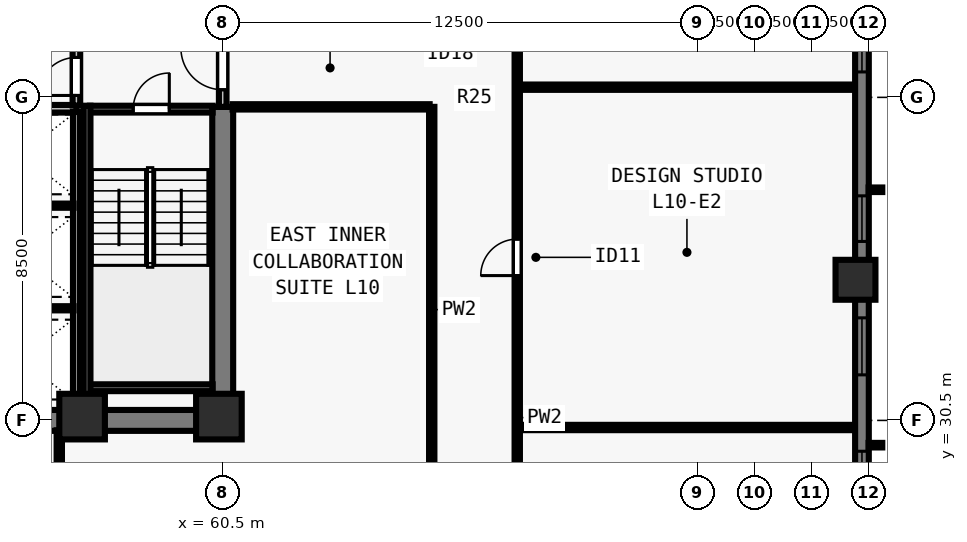
"""IFC4 building model, lengths in metres.
Left out: names, types, materials, properties, quantities, classifications, styles, units other than length and angle.
Written with IfcOpenShell. Run it as: python <this file> out.ifc"""

import sys

from ifc_helpers import new_model, si_unit, direction, frame, frame_2d, origin, origin_2d, place, context, subcontext, project, spatial, rectangle, extrude, element, fill, save


model = new_model("IFC4")
c1 = context("Model", 3, precision=1e-05, world=origin(), true_north=direction((0.0, 1.0)))
c2 = subcontext(c1, "Body", "Model", "MODEL_VIEW")
j1 = project(units=[si_unit("LENGTHUNIT", "METRE"), si_unit("PLANEANGLEUNIT", "RADIAN")], contexts=[c1])
p1 = place(None, origin())
s1 = spatial("IfcSite", under=j1, at=p1, CompositionType="ELEMENT")
p2 = place(p1, origin())
s2 = spatial("IfcBuilding", under=s1, at=p2, CompositionType="ELEMENT")
p3 = place(p2, frame((0.0, 0.0, 41.0)))
s3 = spatial("IfcBuildingStorey", under=s2, at=p3, CompositionType="ELEMENT", Elevation=41.0)
for number, where, z_axis, x_axis in (
    (1, (56.8, 30.6, 0.0), (0.0, 0.0, 1.0), (1.0, 0.0, 0.0)),
    (2, (60.4, 30.6, 0.0), (0.0, 0.0, 1.0), (1.0, 0.0, 0.0)),
):
    element("IfcColumn", number, at=place(p3, frame(where, z_axis=z_axis, x_axis=x_axis)), inside=s3, PredefinedType="COLUMN", context=c2, shape_type="SweptSolid", body=[
        extrude(rectangle(XDim=1.2, YDim=1.2, at=origin_2d()), origin(), (0.0, 0.0, 1.0), 3.5),
    ])
p4 = place(p3, frame((77.15, 34.2, 0.0), z_axis=(0.0, 0.0, 1.0), x_axis=(0.0, 1.0, 0.0)))
e3 = element("IfcColumn", 3, at=p4, inside=s3, PredefinedType="COLUMN", context=c2, shape_type="SweptSolid", body=[
    extrude(rectangle(XDim=1.05, YDim=1.05, at=origin_2d()), origin(), (0.0, 0.0, 1.0), 3.5),
])
p5 = place(p3, frame((77.32, 61.5, 0.0), z_axis=(0.0, 0.0, 1.0), x_axis=(0.0, -1.0, 0.0)))
e4 = element("IfcWall", 4, at=p5, inside=s3, PredefinedType="SOLIDWALL", context=c2, shape_type="SweptSolid", body=[
    extrude(rectangle(XDim=44.662, YDim=0.36, at=frame_2d((22.331, 0.0))), origin(), (0.0, 0.0, 1.0), 3.28),
])
p6 = place(p5, frame((4.93, 0.0, 0.8)))
e5 = element("IfcOpeningElement", 5, at=p6, cuts=e4, PredefinedType="OPENING", context=c2, shape_type="SweptSolid", body=[
    extrude(rectangle(XDim=1.2, YDim=1.544, at=frame_2d((0.6, 0.772))), frame((0.0, 0.19, 0.0), z_axis=(0.0, -1.0, 0.0), x_axis=(1.0, 0.0, 0.0)), (0.0, 0.0, 1.0), 0.38),
])
p7 = place(p5, frame((8.14, 0.0, 0.8)))
e6 = element("IfcOpeningElement", 6, at=p7, cuts=e4, PredefinedType="OPENING", context=c2, shape_type="SweptSolid", body=[
    extrude(rectangle(XDim=1.5, YDim=1.544, at=frame_2d((0.75, 0.772))), frame((0.0, 0.19, 0.0), z_axis=(0.0, -1.0, 0.0), x_axis=(1.0, 0.0, 0.0)), (0.0, 0.0, 1.0), 0.38),
])
p8 = place(p5, frame((11.65, 0.0, 0.8)))
e7 = element("IfcOpeningElement", 7, at=p8, cuts=e4, PredefinedType="OPENING", context=c2, shape_type="SweptSolid", body=[
    extrude(rectangle(XDim=1.2, YDim=1.544, at=frame_2d((0.6, 0.772))), frame((0.0, 0.19, 0.0), z_axis=(0.0, -1.0, 0.0), x_axis=(1.0, 0.0, 0.0)), (0.0, 0.0, 1.0), 0.38),
])
p9 = place(p5, frame((15.311, 0.0, 0.8)))
e8 = element("IfcOpeningElement", 8, at=p9, cuts=e4, PredefinedType="OPENING", context=c2, shape_type="SweptSolid", body=[
    extrude(rectangle(XDim=1.5, YDim=1.544, at=frame_2d((0.75, 0.772))), frame((0.0, 0.19, 0.0), z_axis=(0.0, -1.0, 0.0), x_axis=(1.0, 0.0, 0.0)), (0.0, 0.0, 1.0), 0.38),
])
p10 = place(p5, frame((18.821, 0.0, 0.8)))
e9 = element("IfcOpeningElement", 9, at=p10, cuts=e4, PredefinedType="OPENING", context=c2, shape_type="SweptSolid", body=[
    extrude(rectangle(XDim=1.2, YDim=1.544, at=frame_2d((0.6, 0.772))), frame((0.0, 0.19, 0.0), z_axis=(0.0, -1.0, 0.0), x_axis=(1.0, 0.0, 0.0)), (0.0, 0.0, 1.0), 0.38),
])
p11 = place(p5, frame((20.331, 0.0, 0.8)))
e10 = element("IfcOpeningElement", 10, at=p11, cuts=e4, PredefinedType="OPENING", context=c2, shape_type="SweptSolid", body=[
    extrude(rectangle(XDim=1.5, YDim=1.544, at=frame_2d((0.75, 0.772))), frame((0.0, 0.19, 0.0), z_axis=(0.0, -1.0, 0.0), x_axis=(1.0, 0.0, 0.0)), (0.0, 0.0, 1.0), 0.38),
])
p12 = place(p5, frame((25.091, 0.0, 0.8)))
e11 = element("IfcOpeningElement", 11, at=p12, cuts=e4, PredefinedType="OPENING", context=c2, shape_type="SweptSolid", body=[
    extrude(rectangle(XDim=1.2, YDim=1.544, at=frame_2d((0.6, 0.772))), frame((0.0, 0.19, 0.0), z_axis=(0.0, -1.0, 0.0), x_axis=(1.0, 0.0, 0.0)), (0.0, 0.0, 1.0), 0.38),
])
p13 = place(p5, frame((28.302, 0.0, 0.8)))
e12 = element("IfcOpeningElement", 12, at=p13, cuts=e4, PredefinedType="OPENING", context=c2, shape_type="SweptSolid", body=[
    extrude(rectangle(XDim=1.5, YDim=1.544, at=frame_2d((0.75, 0.772))), frame((0.0, 0.19, 0.0), z_axis=(0.0, -1.0, 0.0), x_axis=(1.0, 0.0, 0.0)), (0.0, 0.0, 1.0), 0.38),
])
p14 = place(p5, frame((31.812, 0.0, 0.8)))
e13 = element("IfcOpeningElement", 13, at=p14, cuts=e4, PredefinedType="OPENING", context=c2, shape_type="SweptSolid", body=[
    extrude(rectangle(XDim=1.2, YDim=1.544, at=frame_2d((0.6, 0.772))), frame((0.0, 0.19, 0.0), z_axis=(0.0, -1.0, 0.0), x_axis=(1.0, 0.0, 0.0)), (0.0, 0.0, 1.0), 0.38),
])
p15 = place(p5, frame((35.022, 0.0, 0.8)))
e14 = element("IfcOpeningElement", 14, at=p15, cuts=e4, PredefinedType="OPENING", context=c2, shape_type="SweptSolid", body=[
    extrude(rectangle(XDim=1.5, YDim=1.544, at=frame_2d((0.75, 0.772))), frame((0.0, 0.19, 0.0), z_axis=(0.0, -1.0, 0.0), x_axis=(1.0, 0.0, 0.0)), (0.0, 0.0, 1.0), 0.38),
])
p16 = place(p5, frame((38.532, 0.0, 0.8)))
e15 = element("IfcOpeningElement", 15, at=p16, cuts=e4, PredefinedType="OPENING", context=c2, shape_type="SweptSolid", body=[
    extrude(rectangle(XDim=1.2, YDim=1.544, at=frame_2d((0.6, 0.772))), frame((0.0, 0.19, 0.0), z_axis=(0.0, -1.0, 0.0), x_axis=(1.0, 0.0, 0.0)), (0.0, 0.0, 1.0), 0.38),
])
p17 = place(p3, frame((43.225, 30.5, 0.0), z_axis=(0.0, 0.0, 1.0), x_axis=(1.0, 0.0, 0.0)))
e16 = element("IfcWall", 16, at=p17, inside=s3, PredefinedType="SHEAR", context=c2, shape_type="SweptSolid", body=[
    extrude(rectangle(XDim=17.55, YDim=0.55, at=frame_2d((8.775, 0.0))), origin(), (0.0, 0.0, 1.0), 3.28),
])
p18 = place(p3, frame((60.5, 30.765, 0.0), z_axis=(0.0, 0.0, 1.0), x_axis=(0.0, 1.0, 0.0)))
e17 = element("IfcWall", 17, at=p18, inside=s3, PredefinedType="SHEAR", context=c2, shape_type="SweptSolid", body=[
    extrude(rectangle(XDim=7.985, YDim=0.55, at=frame_2d((3.993, 0.0))), origin(), (0.0, 0.0, 1.0), 3.28),
])
p19 = place(p3, frame((53.7, 38.7, 0.0), z_axis=(0.0, 0.0, 1.0), x_axis=(1.0, 0.0, 0.0)))
e18 = element("IfcWall", 18, at=p19, inside=s3, PredefinedType="SOLIDWALL", context=c2, shape_type="SweptSolid", body=[
    extrude(rectangle(XDim=2.95, YDim=0.2, at=frame_2d((1.475, 0.0))), origin(), (0.0, 0.0, 1.0), 3.28),
])
p20 = place(p3, frame((60.5, 38.75, 0.0), z_axis=(0.0, 0.0, 1.0), x_axis=(0.0, 1.0, 0.0)))
e19 = element("IfcWall", 19, at=p20, inside=s3, PredefinedType="SOLIDWALL", context=c2, shape_type="SweptSolid", body=[
    extrude(rectangle(XDim=2.05, YDim=0.2, at=frame_2d((1.025, 0.0))), origin(), (0.0, 0.0, 1.0), 3.28),
])
p21 = place(p20, frame((0.45, 0.0, 0.0)))
e20 = element("IfcOpeningElement", 20, at=p21, cuts=e19, PredefinedType="OPENING", context=c2, shape_type="SweptSolid", body=[
    extrude(rectangle(XDim=1.1, YDim=2.15, at=frame_2d((0.55, 1.075))), frame((0.0, 0.11, 0.0), z_axis=(0.0, -1.0, 0.0), x_axis=(1.0, 0.0, 0.0)), (0.0, 0.0, 1.0), 0.22),
])
p22 = place(p3, frame((56.65, 38.785, 0.0), z_axis=(0.0, 0.0, 1.0), x_axis=(0.0, 1.0, 0.0)))
e21 = element("IfcWall", 21, at=p22, inside=s3, PredefinedType="SOLIDWALL", context=c2, shape_type="SweptSolid", body=[
    extrude(rectangle(XDim=4.865, YDim=0.2, at=frame_2d((2.433, 0.0))), origin(), (0.0, 0.0, 1.0), 3.28),
])
p23 = place(p22, frame((0.265, 0.0, 0.0)))
e22 = element("IfcOpeningElement", 22, at=p23, cuts=e21, PredefinedType="OPENING", context=c2, shape_type="SweptSolid", body=[
    extrude(rectangle(XDim=1.0, YDim=2.15, at=frame_2d((0.5, 1.075))), frame((0.0, 0.11, 0.0), z_axis=(0.0, -1.0, 0.0), x_axis=(1.0, 0.0, 0.0)), (0.0, 0.0, 1.0), 0.22),
])
p24 = place(p3, frame((56.65, 30.76, 0.0), z_axis=(0.0, 0.0, 1.0), x_axis=(0.0, 1.0, 0.0)))
e23 = element("IfcWall", 23, at=p24, inside=s3, PredefinedType="SOLIDWALL", context=c2, shape_type="SweptSolid", body=[
    extrude(rectangle(XDim=7.855, YDim=0.18, at=frame_2d((3.927, 0.0))), origin(), (0.0, 0.0, 1.0), 3.28),
])
for number, where, z_axis, x_axis in (
    (24, (53.785, 33.45, 0.0), (0.0, 0.0, 1.0), (1.0, 0.0, 0.0)),
    (25, (53.785, 36.15, 0.0), (0.0, 0.0, 1.0), (1.0, 0.0, 0.0)),
):
    element("IfcWall", number, at=place(p3, frame(where, z_axis=z_axis, x_axis=x_axis)), inside=s3, PredefinedType="PARTITIONING", context=c2, shape_type="SweptSolid", body=[
        extrude(rectangle(XDim=2.79, YDim=0.11, at=frame_2d((1.395, 0.0))), origin(), (0.0, 0.0, 1.0), 3.28),
    ])
p25 = place(p3, frame((68.25, 22.355, 0.0), z_axis=(0.0, 0.0, 1.0), x_axis=(0.0, 1.0, 0.0)))
e26 = element("IfcWall", 26, at=p25, inside=s3, PredefinedType="PARTITIONING", context=c2, shape_type="SweptSolid", body=[
    extrude(rectangle(XDim=33.29, YDim=0.14, at=frame_2d((16.645, 0.0))), origin(), (0.0, 0.0, 1.0), 3.28),
])
p26 = place(p25, frame((3.522, 0.0, 0.0)))
e27 = element("IfcOpeningElement", 27, at=p26, cuts=e26, PredefinedType="OPENING", context=c2, shape_type="SweptSolid", body=[
    extrude(rectangle(XDim=0.96, YDim=2.12, at=frame_2d((0.48, 1.06))), frame((0.0, 0.08, 0.0), z_axis=(0.0, -1.0, 0.0), x_axis=(1.0, 0.0, 0.0)), (0.0, 0.0, 1.0), 0.16),
])
p27 = place(p25, frame((11.956, 0.0, 0.0)))
e28 = element("IfcOpeningElement", 28, at=p27, cuts=e26, PredefinedType="OPENING", context=c2, shape_type="SweptSolid", body=[
    extrude(rectangle(XDim=0.96, YDim=2.12, at=frame_2d((0.48, 1.06))), frame((0.0, 0.08, 0.0), z_axis=(0.0, -1.0, 0.0), x_axis=(1.0, 0.0, 0.0)), (0.0, 0.0, 1.0), 0.16),
])
p28 = place(p25, frame((20.256, 0.0, 0.0)))
e29 = element("IfcOpeningElement", 29, at=p28, cuts=e26, PredefinedType="OPENING", context=c2, shape_type="SweptSolid", body=[
    extrude(rectangle(XDim=0.96, YDim=2.12, at=frame_2d((0.48, 1.06))), frame((0.0, 0.08, 0.0), z_axis=(0.0, -1.0, 0.0), x_axis=(1.0, 0.0, 0.0)), (0.0, 0.0, 1.0), 0.16),
])
p29 = place(p25, frame((28.422, 0.0, 0.0)))
e30 = element("IfcOpeningElement", 30, at=p29, cuts=e26, PredefinedType="OPENING", context=c2, shape_type="SweptSolid", body=[
    extrude(rectangle(XDim=0.96, YDim=2.12, at=frame_2d((0.48, 1.06))), frame((0.0, 0.08, 0.0), z_axis=(0.0, -1.0, 0.0), x_axis=(1.0, 0.0, 0.0)), (0.0, 0.0, 1.0), 0.16),
])
p30 = place(p3, frame((66.0, 24.605, 0.0), z_axis=(0.0, 0.0, 1.0), x_axis=(0.0, 1.0, 0.0)))
e31 = element("IfcWall", 31, at=p30, inside=s3, PredefinedType="PARTITIONING", context=c2, shape_type="SweptSolid", body=[
    extrude(rectangle(XDim=14.145, YDim=0.14, at=frame_2d((7.073, 0.0))), origin(), (0.0, 0.0, 1.0), 3.28),
])
p31 = place(p30, frame((2.445, 0.0, 0.0)))
e32 = element("IfcOpeningElement", 32, at=p31, cuts=e31, PredefinedType="OPENING", context=c2, shape_type="SweptSolid", body=[
    extrude(rectangle(XDim=0.88, YDim=2.1, at=frame_2d((0.44, 1.05))), frame((0.0, 0.08, 0.0), z_axis=(0.0, -1.0, 0.0), x_axis=(1.0, 0.0, 0.0)), (0.0, 0.0, 1.0), 0.16),
])
p32 = place(p3, frame((60.76, 38.75, 0.0), z_axis=(0.0, 0.0, 1.0), x_axis=(1.0, 0.0, 0.0)))
e33 = element("IfcWall", 33, at=p32, inside=s3, PredefinedType="PARTITIONING", context=c2, shape_type="SweptSolid", body=[
    extrude(rectangle(XDim=5.185, YDim=0.14, at=frame_2d((2.593, 0.0))), origin(), (0.0, 0.0, 1.0), 3.28),
])
p33 = place(p3, frame((56.2, 24.605, 0.0), z_axis=(0.0, 0.0, 1.0), x_axis=(0.0, 1.0, 0.0)))
e34 = element("IfcWall", 34, at=p33, inside=s3, PredefinedType="PARTITIONING", context=c2, shape_type="SweptSolid", body=[
    extrude(rectangle(XDim=5.635, YDim=0.14, at=frame_2d((2.817, 0.0))), origin(), (0.0, 0.0, 1.0), 2.849),
])
for number, where, z_axis, x_axis in (
    (35, (68.35, 30.313, 0.0), (0.0, 0.0, 1.0), (1.0, 0.0, 0.0)),
    (36, (68.35, 39.268, 0.0), (0.0, 0.0, 1.0), (1.0, 0.0, 0.0)),
):
    element("IfcWall", number, at=place(p3, frame(where, z_axis=z_axis, x_axis=x_axis)), inside=s3, PredefinedType="PARTITIONING", context=c2, shape_type="SweptSolid", body=[
        extrude(rectangle(XDim=8.73, YDim=0.14, at=frame_2d((4.365, 0.0))), origin(), (0.0, 0.0, 1.0), 3.28),
    ])
p34 = place(p3, frame((57.005, 38.69, 0.0), z_axis=(0.0, 0.0, 1.0), x_axis=(1.0, 0.0, 0.0)))
e37 = element("IfcWall", 37, at=p34, inside=s3, PredefinedType="SOLIDWALL", context=c2, shape_type="SweptSolid", body=[
    extrude(rectangle(XDim=3.23, YDim=0.18, at=frame_2d((1.615, 0.0))), origin(), (0.0, 0.0, 1.0), 3.28),
])
p35 = place(p34, frame((1.14, 0.0, 0.0)))
e38 = element("IfcOpeningElement", 38, at=p35, cuts=e37, PredefinedType="OPENING", context=c2, shape_type="SweptSolid", body=[
    extrude(rectangle(XDim=0.95, YDim=2.15, at=frame_2d((0.475, 1.075))), frame((0.0, 0.1, 0.0), z_axis=(0.0, -1.0, 0.0), x_axis=(1.0, 0.0, 0.0)), (0.0, 0.0, 1.0), 0.2),
])
p36 = place(p3, frame((57.005, 31.36, 0.0), z_axis=(0.0, 0.0, 1.0), x_axis=(1.0, 0.0, 0.0)))
e39 = element("IfcWall", 39, at=p36, inside=s3, PredefinedType="SOLIDWALL", context=c2, shape_type="SweptSolid", body=[
    extrude(rectangle(XDim=3.23, YDim=0.18, at=frame_2d((1.615, 0.0))), origin(), (0.0, 0.0, 1.0), 3.28),
])
p37 = place(p3, frame((56.93, 38.78, 0.0), z_axis=(0.0, 0.0, 1.0), x_axis=(0.0, -1.0, 0.0)))
e40 = element("IfcWall", 40, at=p37, inside=s3, PredefinedType="SOLIDWALL", context=c2, shape_type="SweptSolid", body=[
    extrude(rectangle(XDim=8.017, YDim=0.18, at=frame_2d((4.009, 0.0))), origin(), (0.0, 0.0, 1.0), 3.28),
])
p38 = place(p11, origin())
e41 = element("IfcWindow", 41, at=p38, inside=s3, PartitioningType="SINGLE_PANEL", PredefinedType="WINDOW", context=c2, shape_type="SweptSolid", body=[
    extrude(rectangle(XDim=1.5, YDim=1.544, at=frame_2d((0.75, 0.772))), frame((0.0, -0.05, 0.0), z_axis=(0.0, -1.0, 0.0), x_axis=(1.0, 0.0, 0.0)), (0.0, 0.0, 1.0), 0.06),
])
fill(e10, e41)
p39 = place(p12, origin())
e42 = element("IfcWindow", 42, at=p39, inside=s3, PartitioningType="SINGLE_PANEL", PredefinedType="WINDOW", context=c2, shape_type="SweptSolid", body=[
    extrude(rectangle(XDim=1.2, YDim=1.544, at=frame_2d((0.6, 0.772))), frame((0.0, -0.05, 0.0), z_axis=(0.0, -1.0, 0.0), x_axis=(1.0, 0.0, 0.0)), (0.0, 0.0, 1.0), 0.06),
])
fill(e11, e42)
p40 = place(p13, origin())
e43 = element("IfcWindow", 43, at=p40, inside=s3, PartitioningType="SINGLE_PANEL", PredefinedType="WINDOW", context=c2, shape_type="SweptSolid", body=[
    extrude(rectangle(XDim=1.5, YDim=1.544, at=frame_2d((0.75, 0.772))), frame((0.0, -0.05, 0.0), z_axis=(0.0, -1.0, 0.0), x_axis=(1.0, 0.0, 0.0)), (0.0, 0.0, 1.0), 0.06),
])
fill(e12, e43)
p41 = place(p14, origin())
e44 = element("IfcWindow", 44, at=p41, inside=s3, PartitioningType="SINGLE_PANEL", PredefinedType="WINDOW", context=c2, shape_type="SweptSolid", body=[
    extrude(rectangle(XDim=1.2, YDim=1.544, at=frame_2d((0.6, 0.772))), frame((0.0, -0.05, 0.0), z_axis=(0.0, -1.0, 0.0), x_axis=(1.0, 0.0, 0.0)), (0.0, 0.0, 1.0), 0.06),
])
fill(e13, e44)
p42 = place(p21, origin())
e45 = element("IfcDoor", 45, at=p42, inside=s3, OperationType="SINGLE_SWING_RIGHT", PredefinedType="DOOR", context=c2, shape_type="SweptSolid", body=[
    extrude(rectangle(XDim=1.1, YDim=2.15, at=frame_2d((0.55, 1.075))), frame((0.0, 0.025, 0.0), z_axis=(0.0, -1.0, 0.0), x_axis=(1.0, 0.0, 0.0)), (0.0, 0.0, 1.0), 0.05),
])
fill(e20, e45)
p43 = place(p23, origin())
e46 = element("IfcDoor", 46, at=p43, inside=s3, OperationType="SINGLE_SWING_LEFT", PredefinedType="DOOR", context=c2, shape_type="SweptSolid", body=[
    extrude(rectangle(XDim=1.0, YDim=2.15, at=frame_2d((0.5, 1.075))), frame((0.0, 0.025, 0.0), z_axis=(0.0, -1.0, 0.0), x_axis=(1.0, 0.0, 0.0)), (0.0, 0.0, 1.0), 0.05),
])
fill(e22, e46)
p44 = place(p27, origin())
e47 = element("IfcDoor", 47, at=p44, inside=s3, OperationType="SINGLE_SWING_LEFT", PredefinedType="DOOR", context=c2, shape_type="SweptSolid", body=[
    extrude(rectangle(XDim=0.96, YDim=2.12, at=frame_2d((0.48, 1.06))), frame((0.0, 0.025, 0.0), z_axis=(0.0, -1.0, 0.0), x_axis=(1.0, 0.0, 0.0)), (0.0, 0.0, 1.0), 0.05),
])
fill(e28, e47)
p45 = place(p35, origin())
e48 = element("IfcDoor", 48, at=p45, inside=s3, OperationType="SINGLE_SWING_RIGHT", PredefinedType="DOOR", context=c2, shape_type="SweptSolid", body=[
    extrude(rectangle(XDim=0.95, YDim=2.15, at=frame_2d((0.475, 1.075))), frame((0.0, 0.025, 0.0), z_axis=(0.0, -1.0, 0.0), x_axis=(1.0, 0.0, 0.0)), (0.0, 0.0, 1.0), 0.05),
])
fill(e38, e48)
save(model, sys.argv[1])
